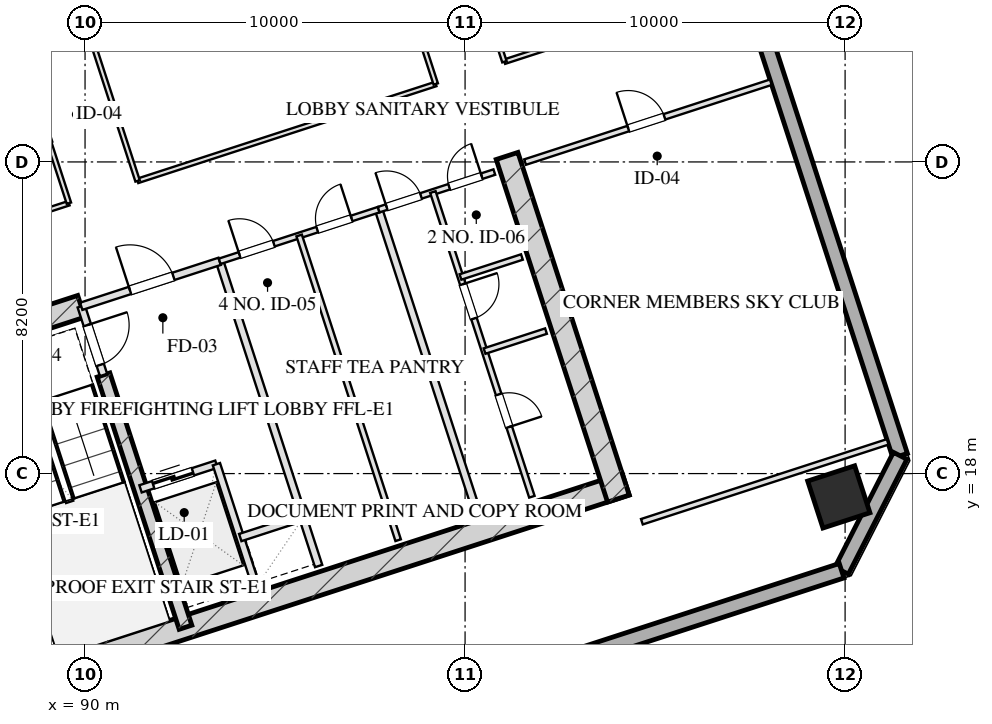
"""IFC4 building model, lengths in metres.
Left out: names, types, materials, properties, quantities, classifications, styles, units other than length and angle.
Written with IfcOpenShell. Run it as: python <this file> out.ifc"""

import sys

from ifc_helpers import new_model, si_unit, direction, frame, frame_2d, origin, origin_2d, place, context, subcontext, project, spatial, rectangle, hollow_rectangle, extrude, element, fill, save


model = new_model("IFC4")
c1 = context("Model", 3, precision=1e-05, world=origin(), true_north=direction((0.0, 1.0)))
c2 = subcontext(c1, "Body", "Model", "MODEL_VIEW")
j1 = project(units=[si_unit("LENGTHUNIT", "METRE"), si_unit("PLANEANGLEUNIT", "RADIAN")], contexts=[c1])
p1 = place(None, origin())
s1 = spatial("IfcSite", under=j1, at=p1, CompositionType="ELEMENT")
p2 = place(p1, origin())
s2 = spatial("IfcBuilding", under=s1, at=p2, CompositionType="ELEMENT")
p3 = place(p2, frame((0.0, 0.0, 156.4)))
s3 = spatial("IfcBuildingStorey", under=s2, at=p3, CompositionType="ELEMENT", Elevation=156.4)
p4 = place(p3, frame((88.63, 12.652, 0.0), z_axis=(0.0, 0.0, 1.0), x_axis=(0.95105714907, 0.309015046886, 0.0)))
e1 = element("IfcWall", 1, at=p4, inside=s3, PredefinedType="SHEAR", context=c2, shape_type="SweptSolid", body=[
    extrude(rectangle(XDim=16.4, YDim=0.6, at=frame_2d((8.2, 0.0))), origin(), (0.0, 0.0, 1.0), 3.45),
])
p5 = place(p3, frame((86.078, 21.475, 0.0), z_axis=(0.0, 0.0, 1.0), x_axis=(0.309017938678, -0.951056209472, 0.0)))
e2 = element("IfcWall", 2, at=p5, inside=s3, PredefinedType="SHEAR", context=c2, shape_type="SweptSolid", body=[
    extrude(rectangle(XDim=9.48, YDim=0.6, at=frame_2d((4.74, 0.0))), origin(), (0.0, 0.0, 1.0), 3.45),
])
p6 = place(p3, frame((101.105, 26.358, 0.0), z_axis=(0.0, 0.0, 1.0), x_axis=(0.309010370028, -0.95105866865, 0.0)))
e3 = element("IfcWall", 3, at=p6, inside=s3, PredefinedType="SHEAR", context=c2, shape_type="SweptSolid", body=[
    extrude(rectangle(XDim=9.48, YDim=0.6, at=frame_2d((4.74, 0.0))), origin(), (0.0, 0.0, 1.0), 3.45),
])
p7 = place(p3, frame((90.486, 20.594, 0.0), z_axis=(0.0, 0.0, 1.0), x_axis=(0.309020428229, -0.951055400562, 0.0)))
e4 = element("IfcWall", 4, at=p7, inside=s3, PredefinedType="SHEAR", context=c2, shape_type="SweptSolid", body=[
    extrude(rectangle(XDim=6.98, YDim=0.35, at=frame_2d((3.49, 0.0))), origin(), (0.0, 0.0, 1.0), 3.45),
])
p8 = place(p3, frame((85.886, 21.097, 0.0), z_axis=(0.0, 0.0, 1.0), x_axis=(0.951068073652, 0.308981422225, 0.0)))
e5 = element("IfcWall", 5, at=p8, inside=s3, PredefinedType="SHEAR", context=c2, shape_type="SweptSolid", body=[
    extrude(rectangle(XDim=4.22, YDim=0.6, at=frame_2d((2.11, 0.0))), origin(), (0.0, 0.0, 1.0), 3.45),
])
p9 = place(p3, frame((109.835, 17.386, 0.0), z_axis=(0.0, 0.0, 1.0), x_axis=(0.951056516295, 0.309016994375, 0.0)))
e6 = element("IfcColumn", 6, at=p9, inside=s3, PredefinedType="COLUMN", context=c2, shape_type="SweptSolid", body=[
    extrude(hollow_rectangle(XDim=1.3, YDim=1.3, WallThickness=0.045, at=origin_2d()), origin(), (0.0, 0.0, 1.0), 3.451),
])
p10 = place(p3, frame((98.224, 59.173, 0.0), z_axis=(0.0, 0.0, 1.0), x_axis=(0.309014228706, -0.951057414911, 0.0)))
e7 = element("IfcWall", 7, at=p10, inside=s3, PredefinedType="SOLIDWALL", context=c2, shape_type="SweptSolid", body=[
    extrude(rectangle(XDim=42.8, YDim=0.4, at=frame_2d((21.4, 0.0))), origin(), (0.0, 0.0, 1.0), 2.61),
])
p11 = place(p10, frame((17.999, 0.0, 0.0)))
e8 = element("IfcOpeningElement", 8, at=p11, cuts=e7, PredefinedType="OPENING", context=c2, shape_type="SweptSolid", body=[
    extrude(rectangle(XDim=1.1, YDim=2.15, at=frame_2d((0.55, 1.075))), frame((0.0, 0.21, 0.0), z_axis=(0.0, -1.0, 0.0), x_axis=(1.0, 0.0, 0.0)), (0.0, 0.0, 1.0), 0.42),
])
p12 = place(p3, frame((111.449, 18.468, 0.0), z_axis=(0.0, 0.0, 1.0), x_axis=(-0.454019523198, -0.890991735402, 0.0)))
e9 = element("IfcWall", 9, at=p12, inside=s3, PredefinedType="SOLIDWALL", context=c2, shape_type="SweptSolid", body=[
    extrude(rectangle(XDim=3.394, YDim=0.4, at=frame_2d((1.697, 0.0))), origin(), (0.0, 0.0, 1.0), 2.61),
])
p13 = place(p3, frame((109.908, 15.444, 0.0), z_axis=(0.0, 0.0, 1.0), x_axis=(-0.951057580055, -0.30901372044, 0.0)))
e10 = element("IfcWall", 10, at=p13, inside=s3, PredefinedType="SOLIDWALL", context=c2, shape_type="SweptSolid", body=[
    extrude(rectangle(XDim=26.4, YDim=0.4, at=frame_2d((13.2, 0.0))), origin(), (0.0, 0.0, 1.0), 2.61),
])
p14 = place(p3, frame((89.899, 22.401, 0.0), z_axis=(0.0, 0.0, 1.0), x_axis=(0.308932062672, -0.951084108086, 0.0)))
e11 = element("IfcWall", 11, at=p14, inside=s3, PredefinedType="PARTITIONING", context=c2, shape_type="SweptSolid", body=[
    extrude(rectangle(XDim=1.9, YDim=0.2, at=frame_2d((0.95, 0.0))), origin(), (0.0, 0.0, 1.0), 3.175),
])
p15 = place(p14, frame((0.52, 0.0, 0.0)))
e12 = element("IfcOpeningElement", 12, at=p15, cuts=e11, PredefinedType="OPENING", context=c2, shape_type="SweptSolid", body=[
    extrude(rectangle(XDim=1.1, YDim=2.05, at=frame_2d((0.55, 1.025))), frame((0.0, 0.11, 0.0), z_axis=(0.0, -1.0, 0.0), x_axis=(1.0, 0.0, 0.0)), (0.0, 0.0, 1.0), 0.22),
])
p16 = place(p3, frame((93.542, 23.585, 0.0), z_axis=(0.0, 0.0, 1.0), x_axis=(0.309042196757, -0.951048327176, 0.0)))
e13 = element("IfcWall", 13, at=p16, inside=s3, PredefinedType="PARTITIONING", context=c2, shape_type="SweptSolid", body=[
    extrude(rectangle(XDim=8.43, YDim=0.2, at=frame_2d((4.215, 0.0))), origin(), (0.0, 0.0, 1.0), 3.175),
])
p17 = place(p3, frame((89.899, 22.401, 0.0), z_axis=(0.0, 0.0, 1.0), x_axis=(0.951046716504, 0.309047153403, 0.0)))
e14 = element("IfcWall", 14, at=p17, inside=s3, PredefinedType="PARTITIONING", context=c2, shape_type="SweptSolid", body=[
    extrude(rectangle(XDim=3.83, YDim=0.2, at=frame_2d((1.915, 0.0))), origin(), (0.0, 0.0, 1.0), 3.175),
])
p18 = place(p17, frame((1.35, 0.0, 0.0)))
e15 = element("IfcOpeningElement", 15, at=p18, cuts=e14, PredefinedType="OPENING", context=c2, shape_type="SweptSolid", body=[
    extrude(rectangle(XDim=1.2, YDim=2.05, at=frame_2d((0.6, 1.025))), frame((0.0, 0.11, 0.0), z_axis=(0.0, -1.0, 0.0), x_axis=(1.0, 0.0, 0.0)), (0.0, 0.0, 1.0), 0.22),
])
p19 = place(p3, frame((91.46, 17.598, 0.0), z_axis=(0.0, 0.0, 1.0), x_axis=(0.951062257173, 0.308999325213, 0.0)))
e16 = element("IfcWall", 16, at=p19, inside=s3, PredefinedType="PARTITIONING", context=c2, shape_type="SweptSolid", body=[
    extrude(rectangle(XDim=2.1, YDim=0.2, at=frame_2d((1.05, 0.0))), origin(), (0.0, 0.0, 1.0), 3.175),
])
p20 = place(p19, frame((0.35, 0.0, 0.0)))
e17 = element("IfcOpeningElement", 17, at=p20, cuts=e16, PredefinedType="OPENING", context=c2, shape_type="SweptSolid", body=[
    extrude(rectangle(XDim=1.1, YDim=2.05, at=frame_2d((0.55, 1.025))), frame((0.0, 0.11, 0.0), z_axis=(0.0, -1.0, 0.0), x_axis=(1.0, 0.0, 0.0)), (0.0, 0.0, 1.0), 0.22),
])
p21 = place(p3, frame((93.457, 18.247, 0.0), z_axis=(0.0, 0.0, 1.0), x_axis=(0.3089935693, -0.951064127245, 0.0)))
e18 = element("IfcWall", 18, at=p21, inside=s3, PredefinedType="PARTITIONING", context=c2, shape_type="SweptSolid", body=[
    extrude(rectangle(XDim=3.7, YDim=0.2, at=frame_2d((1.85, 0.0))), origin(), (0.0, 0.0, 1.0), 3.175),
])
p22 = place(p3, frame((94.084, 16.317, 0.0), z_axis=(0.0, 0.0, 1.0), x_axis=(0.951041328149, 0.309063734775, 0.0)))
e19 = element("IfcWall", 19, at=p22, inside=s3, PredefinedType="PARTITIONING", context=c2, shape_type="SweptSolid", body=[
    extrude(rectangle(XDim=1.73, YDim=0.2, at=frame_2d((0.865, 0.0))), origin(), (0.0, 0.0, 1.0), 3.175),
])
p23 = place(p3, frame((97.727, 24.944, 0.0), z_axis=(0.0, 0.0, 1.0), x_axis=(0.309016001439, -0.951056838919, 0.0)))
e20 = element("IfcWall", 20, at=p23, inside=s3, PredefinedType="PARTITIONING", context=c2, shape_type="SweptSolid", body=[
    extrude(rectangle(XDim=8.43, YDim=0.2, at=frame_2d((4.215, 0.0))), origin(), (0.0, 0.0, 1.0), 3.175),
])
p24 = place(p3, frame((93.542, 23.585, 0.0), z_axis=(0.0, 0.0, 1.0), x_axis=(0.951063829732, 0.308994485023, 0.0)))
e21 = element("IfcWall", 21, at=p24, inside=s3, PredefinedType="PARTITIONING", context=c2, shape_type="SweptSolid", body=[
    extrude(rectangle(XDim=4.4, YDim=0.15, at=frame_2d((2.2, 0.0))), origin(), (0.0, 0.0, 1.0), 3.175),
])
p25 = place(p24, frame((0.55, 0.0, 0.0)))
e22 = element("IfcOpeningElement", 22, at=p25, cuts=e21, PredefinedType="OPENING", context=c2, shape_type="SweptSolid", body=[
    extrude(rectangle(XDim=0.95, YDim=2.05, at=frame_2d((0.475, 1.025))), frame((0.0, 0.085, 0.0), z_axis=(0.0, -1.0, 0.0), x_axis=(1.0, 0.0, 0.0)), (0.0, 0.0, 1.0), 0.17),
])
p26 = place(p24, frame((2.7, 0.0, 0.0)))
e23 = element("IfcOpeningElement", 23, at=p26, cuts=e21, PredefinedType="OPENING", context=c2, shape_type="SweptSolid", body=[
    extrude(rectangle(XDim=0.95, YDim=2.05, at=frame_2d((0.475, 1.025))), frame((0.0, 0.085, 0.0), z_axis=(0.0, -1.0, 0.0), x_axis=(1.0, 0.0, 0.0)), (0.0, 0.0, 1.0), 0.17),
])
p27 = place(p3, frame((95.634, 24.265, 0.0), z_axis=(0.0, 0.0, 1.0), x_axis=(0.309007490203, -0.951059604335, 0.0)))
e24 = element("IfcWall", 24, at=p27, inside=s3, PredefinedType="PARTITIONING", context=c2, shape_type="SweptSolid", body=[
    extrude(rectangle(XDim=8.43, YDim=0.15, at=frame_2d((4.215, 0.0))), origin(), (0.0, 0.0, 1.0), 3.175),
])
p28 = place(p3, frame((97.727, 24.944, 0.0), z_axis=(0.0, 0.0, 1.0), x_axis=(0.951036872128, 0.309077446369, 0.0)))
e25 = element("IfcWall", 25, at=p28, inside=s3, PredefinedType="PARTITIONING", context=c2, shape_type="SweptSolid", body=[
    extrude(rectangle(XDim=3.2, YDim=0.15, at=frame_2d((1.6, 0.0))), origin(), (0.0, 0.0, 1.0), 3.175),
])
p29 = place(p28, frame((0.22, 0.0, 0.0)))
e26 = element("IfcOpeningElement", 26, at=p29, cuts=e25, PredefinedType="OPENING", context=c2, shape_type="SweptSolid", body=[
    extrude(rectangle(XDim=0.95, YDim=2.05, at=frame_2d((0.475, 1.025))), frame((0.0, 0.085, 0.0), z_axis=(0.0, -1.0, 0.0), x_axis=(1.0, 0.0, 0.0)), (0.0, 0.0, 1.0), 0.17),
])
p30 = place(p28, frame((1.95, 0.0, 0.0)))
e27 = element("IfcOpeningElement", 27, at=p30, cuts=e25, PredefinedType="OPENING", context=c2, shape_type="SweptSolid", body=[
    extrude(rectangle(XDim=0.9, YDim=2.05, at=frame_2d((0.45, 1.025))), frame((0.0, 0.085, 0.0), z_axis=(0.0, -1.0, 0.0), x_axis=(1.0, 0.0, 0.0)), (0.0, 0.0, 1.0), 0.17),
])
p31 = place(p3, frame((99.153, 25.408, 0.0), z_axis=(0.0, 0.0, 1.0), x_axis=(0.309016001439, -0.951056838919, 0.0)))
e28 = element("IfcWall", 28, at=p31, inside=s3, PredefinedType="PARTITIONING", context=c2, shape_type="SweptSolid", body=[
    extrude(rectangle(XDim=8.43, YDim=0.15, at=frame_2d((4.215, 0.0))), origin(), (0.0, 0.0, 1.0), 3.175),
])
p32 = place(p31, frame((2.55, 0.0, 0.0)))
e29 = element("IfcOpeningElement", 29, at=p32, cuts=e28, PredefinedType="OPENING", context=c2, shape_type="SweptSolid", body=[
    extrude(rectangle(XDim=0.95, YDim=2.05, at=frame_2d((0.475, 1.025))), frame((0.0, 0.085, 0.0), z_axis=(0.0, -1.0, 0.0), x_axis=(1.0, 0.0, 0.0)), (0.0, 0.0, 1.0), 0.17),
])
p33 = place(p31, frame((5.6, 0.0, 0.0)))
e30 = element("IfcOpeningElement", 30, at=p33, cuts=e28, PredefinedType="OPENING", context=c2, shape_type="SweptSolid", body=[
    extrude(rectangle(XDim=0.9, YDim=2.05, at=frame_2d((0.45, 1.025))), frame((0.0, 0.085, 0.0), z_axis=(0.0, -1.0, 0.0), x_axis=(1.0, 0.0, 0.0)), (0.0, 0.0, 1.0), 0.17),
])
for number, where, z_axis, x_axis in (
    (31, (100.513, 21.223, 0.0), (0.0, 0.0, 1.0), (0.951, 0.309, 0.0)),
    (32, (99.879, 23.173, 0.0), (0.0, 0.0, 1.0), (0.951, 0.309, 0.0)),
):
    element("IfcWall", number, at=place(p3, frame(where, z_axis=z_axis, x_axis=x_axis)), inside=s3, PredefinedType="PARTITIONING", context=c2, shape_type="SweptSolid", body=[
        extrude(rectangle(XDim=1.7, YDim=0.15, at=frame_2d((0.85, 0.0))), origin(), (0.0, 0.0, 1.0), 3.175),
    ])
p34 = place(p3, frame((104.653, 16.733, 0.0), z_axis=(0.0, 0.0, 1.0), x_axis=(0.951054383043, 0.309023559774, 0.0)))
e33 = element("IfcWall", 33, at=p34, inside=s3, PredefinedType="PARTITIONING", context=c2, shape_type="SweptSolid", body=[
    extrude(rectangle(XDim=6.8, YDim=0.15, at=frame_2d((3.4, 0.0))), origin(), (0.0, 0.0, 1.0), 3.175),
])
p35 = place(p3, frame((101.578, 26.196, 0.0), z_axis=(0.0, 0.0, 1.0), x_axis=(0.951064934653, 0.308991084134, 0.0)))
e34 = element("IfcWall", 34, at=p35, inside=s3, PredefinedType="PARTITIONING", context=c2, shape_type="SweptSolid", body=[
    extrude(rectangle(XDim=6.8, YDim=0.15, at=frame_2d((3.4, 0.0))), origin(), (0.0, 0.0, 1.0), 3.175),
])
p36 = place(p35, frame((2.856, 0.0, 0.0)))
e35 = element("IfcOpeningElement", 35, at=p36, cuts=e34, PredefinedType="OPENING", context=c2, shape_type="SweptSolid", body=[
    extrude(rectangle(XDim=1.0, YDim=2.05, at=frame_2d((0.5, 1.025))), frame((0.0, 0.085, 0.0), z_axis=(0.0, -1.0, 0.0), x_axis=(1.0, 0.0, 0.0)), (0.0, 0.0, 1.0), 0.17),
])
p37 = place(p3, frame((77.925, 21.328, 0.0), z_axis=(0.0, 0.0, 1.0), x_axis=(0.95105749975, 0.309013967595, 0.0)))
e36 = element("IfcWall", 36, at=p37, inside=s3, PredefinedType="PARTITIONING", context=c2, shape_type="SweptSolid", body=[
    extrude(rectangle(XDim=12.25, YDim=0.12, at=frame_2d((6.125, 0.0))), origin(), (0.0, 0.0, 1.0), 3.175),
])
p38 = place(p3, frame((91.382, 25.701, 0.0), z_axis=(0.0, 0.0, 1.0), x_axis=(0.951061683147, 0.309001091988, 0.0)))
e37 = element("IfcWall", 37, at=p38, inside=s3, PredefinedType="PARTITIONING", context=c2, shape_type="SweptSolid", body=[
    extrude(rectangle(XDim=8.25, YDim=0.12, at=frame_2d((4.125, 0.0))), origin(), (0.0, 0.0, 1.0), 3.175),
])
p39 = place(p3, frame((101.035, 28.837, 0.0), z_axis=(0.0, 0.0, 1.0), x_axis=(0.95104869662, 0.309041059824, 0.0)))
e38 = element("IfcWall", 38, at=p39, inside=s3, PredefinedType="PARTITIONING", context=c2, shape_type="SweptSolid", body=[
    extrude(rectangle(XDim=6.5, YDim=0.12, at=frame_2d((3.25, 0.0))), origin(), (0.0, 0.0, 1.0), 3.175),
])
p40 = place(p3, frame((89.575, 25.114, 0.0), z_axis=(0.0, 0.0, 1.0), x_axis=(-0.30901773025, 0.951056277195, 0.0)))
e39 = element("IfcWall", 39, at=p40, inside=s3, PredefinedType="PARTITIONING", context=c2, shape_type="SweptSolid", body=[
    extrude(rectangle(XDim=16.64, YDim=0.12, at=frame_2d((8.32, 0.0))), origin(), (0.0, 0.0, 1.0), 3.175),
])
p41 = place(p40, frame((1.66, 0.0, 0.0)))
e40 = element("IfcOpeningElement", 40, at=p41, cuts=e39, PredefinedType="OPENING", context=c2, shape_type="SweptSolid", body=[
    extrude(rectangle(XDim=1.0, YDim=2.05, at=frame_2d((0.5, 1.025))), frame((0.0, 0.07, 0.0), z_axis=(0.0, -1.0, 0.0), x_axis=(1.0, 0.0, 0.0)), (0.0, 0.0, 1.0), 0.14),
])
p42 = place(p40, frame((7.82, 0.0, 0.0)))
e41 = element("IfcOpeningElement", 41, at=p42, cuts=e39, PredefinedType="OPENING", context=c2, shape_type="SweptSolid", body=[
    extrude(rectangle(XDim=1.05, YDim=2.05, at=frame_2d((0.525, 1.025))), frame((0.0, 0.07, 0.0), z_axis=(0.0, -1.0, 0.0), x_axis=(1.0, 0.0, 0.0)), (0.0, 0.0, 1.0), 0.14),
])
p43 = place(p40, frame((13.98, 0.0, 0.0)))
e42 = element("IfcOpeningElement", 42, at=p43, cuts=e39, PredefinedType="OPENING", context=c2, shape_type="SweptSolid", body=[
    extrude(rectangle(XDim=1.0, YDim=2.05, at=frame_2d((0.5, 1.025))), frame((0.0, 0.07, 0.0), z_axis=(0.0, -1.0, 0.0), x_axis=(1.0, 0.0, 0.0)), (0.0, 0.0, 1.0), 0.14),
])
p44 = place(p3, frame((91.382, 25.701, 0.0), z_axis=(0.0, 0.0, 1.0), x_axis=(-0.309004459387, 0.951060589068, 0.0)))
e43 = element("IfcWall", 43, at=p44, inside=s3, PredefinedType="PARTITIONING", context=c2, shape_type="SweptSolid", body=[
    extrude(rectangle(XDim=16.64, YDim=0.12, at=frame_2d((8.32, 0.0))), origin(), (0.0, 0.0, 1.0), 3.175),
])
p45 = place(p44, frame((7.987, 0.0, 0.0)))
e44 = element("IfcOpeningElement", 44, at=p45, cuts=e43, PredefinedType="OPENING", context=c2, shape_type="SweptSolid", body=[
    extrude(rectangle(XDim=1.1, YDim=2.05, at=frame_2d((0.55, 1.025))), frame((0.0, 0.07, 0.0), z_axis=(0.0, -1.0, 0.0), x_axis=(1.0, 0.0, 0.0)), (0.0, 0.0, 1.0), 0.14),
])
p46 = place(p3, frame((99.229, 28.25, 0.0), z_axis=(0.0, 0.0, 1.0), x_axis=(-0.30901773025, 0.951056277195, 0.0)))
e45 = element("IfcWall", 45, at=p46, inside=s3, PredefinedType="PARTITIONING", context=c2, shape_type="SweptSolid", body=[
    extrude(rectangle(XDim=16.64, YDim=0.12, at=frame_2d((8.32, 0.0))), origin(), (0.0, 0.0, 1.0), 3.175),
])
p47 = place(p3, frame((101.035, 28.837, 0.0), z_axis=(0.0, 0.0, 1.0), x_axis=(-0.30901773025, 0.951056277195, 0.0)))
e46 = element("IfcWall", 46, at=p47, inside=s3, PredefinedType="PARTITIONING", context=c2, shape_type="SweptSolid", body=[
    extrude(rectangle(XDim=16.64, YDim=0.12, at=frame_2d((8.32, 0.0))), origin(), (0.0, 0.0, 1.0), 3.175),
])
p48 = place(p47, frame((1.16, 0.0, 0.0)))
e47 = element("IfcOpeningElement", 47, at=p48, cuts=e46, PredefinedType="OPENING", context=c2, shape_type="SweptSolid", body=[
    extrude(rectangle(XDim=1.0, YDim=2.05, at=frame_2d((0.5, 1.025))), frame((0.0, 0.07, 0.0), z_axis=(0.0, -1.0, 0.0), x_axis=(1.0, 0.0, 0.0)), (0.0, 0.0, 1.0), 0.14),
])
p49 = place(p47, frame((4.72, 0.0, 0.0)))
e48 = element("IfcOpeningElement", 48, at=p49, cuts=e46, PredefinedType="OPENING", context=c2, shape_type="SweptSolid", body=[
    extrude(rectangle(XDim=1.0, YDim=2.05, at=frame_2d((0.5, 1.025))), frame((0.0, 0.07, 0.0), z_axis=(0.0, -1.0, 0.0), x_axis=(1.0, 0.0, 0.0)), (0.0, 0.0, 1.0), 0.14),
])
p50 = place(p47, frame((7.82, 0.0, 0.0)))
e49 = element("IfcOpeningElement", 49, at=p50, cuts=e46, PredefinedType="OPENING", context=c2, shape_type="SweptSolid", body=[
    extrude(rectangle(XDim=1.0, YDim=2.05, at=frame_2d((0.5, 1.025))), frame((0.0, 0.07, 0.0), z_axis=(0.0, -1.0, 0.0), x_axis=(1.0, 0.0, 0.0)), (0.0, 0.0, 1.0), 0.14),
])
p51 = place(p47, frame((10.671, 0.0, 0.0)))
e50 = element("IfcOpeningElement", 50, at=p51, cuts=e46, PredefinedType="OPENING", context=c2, shape_type="SweptSolid", body=[
    extrude(rectangle(XDim=1.0, YDim=2.05, at=frame_2d((0.5, 1.025))), frame((0.0, 0.07, 0.0), z_axis=(0.0, -1.0, 0.0), x_axis=(1.0, 0.0, 0.0)), (0.0, 0.0, 1.0), 0.14),
])
p52 = place(p47, frame((13.971, 0.0, 0.0)))
e51 = element("IfcOpeningElement", 51, at=p52, cuts=e46, PredefinedType="OPENING", context=c2, shape_type="SweptSolid", body=[
    extrude(rectangle(XDim=1.05, YDim=2.05, at=frame_2d((0.525, 1.025))), frame((0.0, 0.07, 0.0), z_axis=(0.0, -1.0, 0.0), x_axis=(1.0, 0.0, 0.0)), (0.0, 0.0, 1.0), 0.14),
])
p53 = place(p15, origin())
e52 = element("IfcDoor", 52, at=p53, inside=s3, OperationType="SINGLE_SWING_LEFT", PredefinedType="DOOR", context=c2, shape_type="SweptSolid", body=[
    extrude(rectangle(XDim=1.1, YDim=2.05, at=frame_2d((0.55, 1.025))), frame((0.0, 0.025, 0.0), z_axis=(0.0, -1.0, 0.0), x_axis=(1.0, 0.0, 0.0)), (0.0, 0.0, 1.0), 0.05),
])
fill(e12, e52)
p54 = place(p18, origin())
e53 = element("IfcDoor", 53, at=p54, inside=s3, OperationType="SINGLE_SWING_LEFT", PredefinedType="DOOR", context=c2, shape_type="SweptSolid", body=[
    extrude(rectangle(XDim=1.2, YDim=2.05, at=frame_2d((0.6, 1.025))), frame((0.0, 0.025, 0.0), z_axis=(0.0, -1.0, 0.0), x_axis=(1.0, 0.0, 0.0)), (0.0, 0.0, 1.0), 0.05),
])
fill(e15, e53)
p55 = place(p20, origin())
e54 = element("IfcDoor", 54, at=p55, inside=s3, OperationType="DOUBLE_DOOR_SLIDING", PredefinedType="DOOR", context=c2, shape_type="SweptSolid", body=[
    extrude(rectangle(XDim=1.1, YDim=2.05, at=frame_2d((0.55, 1.025))), frame((0.0, 0.025, 0.0), z_axis=(0.0, -1.0, 0.0), x_axis=(1.0, 0.0, 0.0)), (0.0, 0.0, 1.0), 0.05),
])
fill(e17, e54)
p56 = place(p25, origin())
e55 = element("IfcDoor", 55, at=p56, inside=s3, OperationType="SINGLE_SWING_LEFT", PredefinedType="DOOR", context=c2, shape_type="SweptSolid", body=[
    extrude(rectangle(XDim=0.95, YDim=2.05, at=frame_2d((0.475, 1.025))), frame((0.0, 0.025, 0.0), z_axis=(0.0, -1.0, 0.0), x_axis=(1.0, 0.0, 0.0)), (0.0, 0.0, 1.0), 0.05),
])
fill(e22, e55)
p57 = place(p26, origin())
e56 = element("IfcDoor", 56, at=p57, inside=s3, OperationType="SINGLE_SWING_RIGHT", PredefinedType="DOOR", context=c2, shape_type="SweptSolid", body=[
    extrude(rectangle(XDim=0.95, YDim=2.05, at=frame_2d((0.475, 1.025))), frame((0.0, 0.025, 0.0), z_axis=(0.0, -1.0, 0.0), x_axis=(1.0, 0.0, 0.0)), (0.0, 0.0, 1.0), 0.05),
])
fill(e23, e56)
p58 = place(p29, origin())
e57 = element("IfcDoor", 57, at=p58, inside=s3, OperationType="SINGLE_SWING_LEFT", PredefinedType="DOOR", context=c2, shape_type="SweptSolid", body=[
    extrude(rectangle(XDim=0.95, YDim=2.05, at=frame_2d((0.475, 1.025))), frame((0.0, 0.025, 0.0), z_axis=(0.0, -1.0, 0.0), x_axis=(1.0, 0.0, 0.0)), (0.0, 0.0, 1.0), 0.05),
])
fill(e26, e57)
p59 = place(p30, origin())
e58 = element("IfcDoor", 58, at=p59, inside=s3, OperationType="SINGLE_SWING_RIGHT", PredefinedType="DOOR", context=c2, shape_type="SweptSolid", body=[
    extrude(rectangle(XDim=0.9, YDim=2.05, at=frame_2d((0.45, 1.025))), frame((0.0, 0.025, 0.0), z_axis=(0.0, -1.0, 0.0), x_axis=(1.0, 0.0, 0.0)), (0.0, 0.0, 1.0), 0.05),
])
fill(e27, e58)
p60 = place(p32, origin())
e59 = element("IfcDoor", 59, at=p60, inside=s3, OperationType="SINGLE_SWING_LEFT", PredefinedType="DOOR", context=c2, shape_type="SweptSolid", body=[
    extrude(rectangle(XDim=0.95, YDim=2.05, at=frame_2d((0.475, 1.025))), frame((0.0, 0.025, 0.0), z_axis=(0.0, -1.0, 0.0), x_axis=(1.0, 0.0, 0.0)), (0.0, 0.0, 1.0), 0.05),
])
fill(e29, e59)
p61 = place(p33, origin())
e60 = element("IfcDoor", 60, at=p61, inside=s3, OperationType="SINGLE_SWING_RIGHT", PredefinedType="DOOR", context=c2, shape_type="SweptSolid", body=[
    extrude(rectangle(XDim=0.9, YDim=2.05, at=frame_2d((0.45, 1.025))), frame((0.0, 0.025, 0.0), z_axis=(0.0, -1.0, 0.0), x_axis=(1.0, 0.0, 0.0)), (0.0, 0.0, 1.0), 0.05),
])
fill(e30, e60)
p62 = place(p36, origin())
e61 = element("IfcDoor", 61, at=p62, inside=s3, OperationType="SINGLE_SWING_LEFT", PredefinedType="DOOR", context=c2, shape_type="SweptSolid", body=[
    extrude(rectangle(XDim=1.0, YDim=2.05, at=frame_2d((0.5, 1.025))), frame((0.0, 0.025, 0.0), z_axis=(0.0, -1.0, 0.0), x_axis=(1.0, 0.0, 0.0)), (0.0, 0.0, 1.0), 0.05),
])
fill(e35, e61)
save(model, sys.argv[1])
